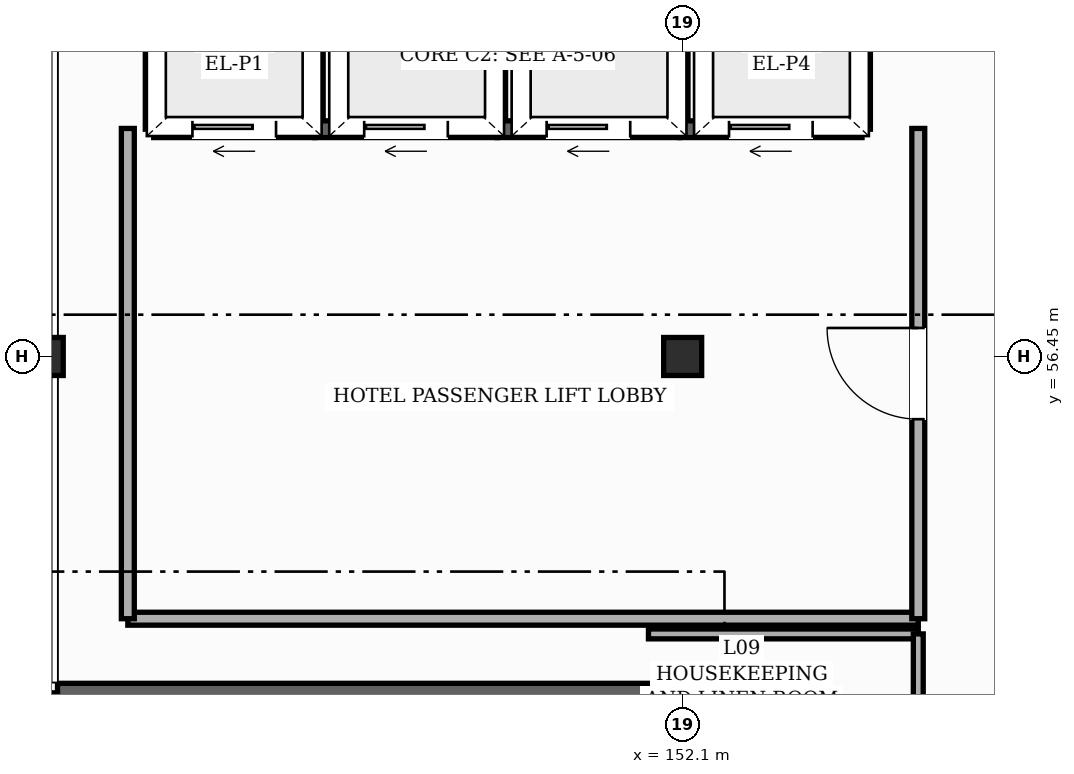
"""IFC4 building model, lengths in metres.
Left out: names, types, materials, properties, quantities, classifications, styles, units other than length and angle.
Written with IfcOpenShell. Run it as: python <this file> out.ifc"""

import sys

from ifc_helpers import new_model, si_unit, direction, frame, frame_2d, origin, origin_2d, place, context, subcontext, project, spatial, rectangle, hollow_rectangle, extrude, element, fill, save


model = new_model("IFC4")
c1 = context("Model", 3, precision=1e-05, world=origin(), true_north=direction((0.0, 1.0)))
c2 = subcontext(c1, "Body", "Model", "MODEL_VIEW")
j1 = project(units=[si_unit("LENGTHUNIT", "METRE"), si_unit("PLANEANGLEUNIT", "RADIAN")], contexts=[c1])
p1 = place(None, origin())
s1 = spatial("IfcSite", under=j1, at=p1, CompositionType="ELEMENT")
p2 = place(p1, origin())
s2 = spatial("IfcBuilding", under=s1, at=p2, CompositionType="ELEMENT")
p3 = place(p2, frame((0.0, 0.0, 39.0)))
s3 = spatial("IfcBuildingStorey", under=s2, at=p3, CompositionType="ELEMENT", Elevation=39.0)
for number, where, z_axis, x_axis in (
    (1, (143.7, 56.45, 0.0), (0.0, 0.0, 1.0), (1.0, 0.0, 0.0)),
    (2, (152.1, 56.45, 0.0), (0.0, 0.0, 1.0), (1.0, 0.0, 0.0)),
):
    element("IfcColumn", number, at=place(p3, frame(where, z_axis=z_axis, x_axis=x_axis)), inside=s3, PredefinedType="COLUMN", context=c2, shape_type="SweptSolid", body=[
        extrude(hollow_rectangle(XDim=0.5, YDim=0.5, WallThickness=0.022, InnerFilletRadius=0.022, OuterFilletRadius=0.044, at=origin_2d()), origin(), (0.0, 0.0, 1.0), 3.6),
    ])
for number, where, z_axis, x_axis in (
    (3, (143.875, 48.675, 0.0), (0.0, 0.0, 1.0), (0.0, 1.0, 0.0)),
    (4, (151.775, 52.025, 0.0), (0.0, 0.0, 1.0), (0.0, -1.0, 0.0)),
):
    element("IfcWall", number, at=place(p3, frame(where, z_axis=z_axis, x_axis=x_axis)), inside=s3, PredefinedType="SHEAR", context=c2, shape_type="SweptSolid", body=[
        extrude(rectangle(XDim=3.35, YDim=0.25, at=frame_2d((1.675, 0.0))), origin(), (0.0, 0.0, 1.0), 3.38),
    ])
p4 = place(p3, frame((143.875, 52.025, 0.0), z_axis=(0.0, 0.0, 1.0), x_axis=(1.0, 0.0, 0.0)))
e5 = element("IfcWall", 5, at=p4, inside=s3, PredefinedType="SHEAR", context=c2, shape_type="SweptSolid", body=[
    extrude(rectangle(XDim=7.9, YDim=0.25, at=frame_2d((3.95, 0.0))), origin(), (0.0, 0.0, 1.0), 3.38),
])
p5 = place(p3, frame((145.14, 59.44, 0.0), z_axis=(0.0, 0.0, 1.0), x_axis=(1.0, 0.0, 0.0)))
e6 = element("IfcWall", 6, at=p5, inside=s3, PredefinedType="SHEAR", context=c2, shape_type="SweptSolid", body=[
    extrude(rectangle(XDim=2.12, YDim=0.22, at=frame_2d((1.06, 0.0))), origin(), (0.0, 0.0, 1.0), 3.38),
])
p6 = place(p5, frame((0.51, 0.0, 0.0)))
e7 = element("IfcOpeningElement", 7, at=p6, cuts=e6, PredefinedType="OPENING", context=c2, shape_type="SweptSolid", body=[
    extrude(rectangle(XDim=1.1, YDim=2.2, at=frame_2d((0.55, 1.1))), frame((0.0, 0.12, 0.0), z_axis=(0.0, -1.0, 0.0), x_axis=(1.0, 0.0, 0.0)), (0.0, 0.0, 1.0), 0.24),
])
for number, where, z_axis, x_axis in (
    (8, (147.26, 59.44, 0.0), (0.0, 0.0, 1.0), (0.0, 1.0, 0.0)),
    (9, (145.14, 59.44, 0.0), (0.0, 0.0, 1.0), (0.0, 1.0, 0.0)),
):
    element("IfcWall", number, at=place(p3, frame(where, z_axis=z_axis, x_axis=x_axis)), inside=s3, PredefinedType="SHEAR", context=c2, shape_type="SweptSolid", body=[
        extrude(rectangle(XDim=1.92, YDim=0.22, at=frame_2d((0.96, 0.0))), origin(), (0.0, 0.0, 1.0), 3.38),
    ])
p7 = place(p3, frame((147.26, 59.44, 0.0), z_axis=(0.0, 0.0, 1.0), x_axis=(1.0, 0.0, 0.0)))
e10 = element("IfcWall", 10, at=p7, inside=s3, PredefinedType="SHEAR", context=c2, shape_type="SweptSolid", body=[
    extrude(rectangle(XDim=2.4, YDim=0.22, at=frame_2d((1.2, 0.0))), origin(), (0.0, 0.0, 1.0), 3.38),
])
p8 = place(p7, frame((0.65, 0.0, 0.0)))
e11 = element("IfcOpeningElement", 11, at=p8, cuts=e10, PredefinedType="OPENING", context=c2, shape_type="SweptSolid", body=[
    extrude(rectangle(XDim=1.1, YDim=2.2, at=frame_2d((0.55, 1.1))), frame((0.0, 0.12, 0.0), z_axis=(0.0, -1.0, 0.0), x_axis=(1.0, 0.0, 0.0)), (0.0, 0.0, 1.0), 0.24),
])
p9 = place(p3, frame((149.66, 59.44, 0.0), z_axis=(0.0, 0.0, 1.0), x_axis=(0.0, 1.0, 0.0)))
e12 = element("IfcWall", 12, at=p9, inside=s3, PredefinedType="SHEAR", context=c2, shape_type="SweptSolid", body=[
    extrude(rectangle(XDim=1.92, YDim=0.22, at=frame_2d((0.96, 0.0))), origin(), (0.0, 0.0, 1.0), 3.38),
])
p10 = place(p3, frame((149.66, 59.44, 0.0), z_axis=(0.0, 0.0, 1.0), x_axis=(1.0, 0.0, 0.0)))
e13 = element("IfcWall", 13, at=p10, inside=s3, PredefinedType="SHEAR", context=c2, shape_type="SweptSolid", body=[
    extrude(rectangle(XDim=2.4, YDim=0.22, at=frame_2d((1.2, 0.0))), origin(), (0.0, 0.0, 1.0), 3.38),
])
p11 = place(p10, frame((0.65, 0.0, 0.0)))
e14 = element("IfcOpeningElement", 14, at=p11, cuts=e13, PredefinedType="OPENING", context=c2, shape_type="SweptSolid", body=[
    extrude(rectangle(XDim=1.1, YDim=2.2, at=frame_2d((0.55, 1.1))), frame((0.0, 0.12, 0.0), z_axis=(0.0, -1.0, 0.0), x_axis=(1.0, 0.0, 0.0)), (0.0, 0.0, 1.0), 0.24),
])
p12 = place(p3, frame((152.06, 59.44, 0.0), z_axis=(0.0, 0.0, 1.0), x_axis=(0.0, 1.0, 0.0)))
e15 = element("IfcWall", 15, at=p12, inside=s3, PredefinedType="SHEAR", context=c2, shape_type="SweptSolid", body=[
    extrude(rectangle(XDim=1.92, YDim=0.22, at=frame_2d((0.96, 0.0))), origin(), (0.0, 0.0, 1.0), 3.38),
])
p13 = place(p3, frame((152.06, 59.44, 0.0), z_axis=(0.0, 0.0, 1.0), x_axis=(1.0, 0.0, 0.0)))
e16 = element("IfcWall", 16, at=p13, inside=s3, PredefinedType="SHEAR", context=c2, shape_type="SweptSolid", body=[
    extrude(rectangle(XDim=2.4, YDim=0.22, at=frame_2d((1.2, 0.0))), origin(), (0.0, 0.0, 1.0), 3.38),
])
p14 = place(p13, frame((0.65, 0.0, 0.0)))
e17 = element("IfcOpeningElement", 17, at=p14, cuts=e16, PredefinedType="OPENING", context=c2, shape_type="SweptSolid", body=[
    extrude(rectangle(XDim=1.1, YDim=2.2, at=frame_2d((0.55, 1.1))), frame((0.0, 0.12, 0.0), z_axis=(0.0, -1.0, 0.0), x_axis=(1.0, 0.0, 0.0)), (0.0, 0.0, 1.0), 0.24),
])
p15 = place(p3, frame((154.46, 59.44, 0.0), z_axis=(0.0, 0.0, 1.0), x_axis=(0.0, 1.0, 0.0)))
e18 = element("IfcWall", 18, at=p15, inside=s3, PredefinedType="SHEAR", context=c2, shape_type="SweptSolid", body=[
    extrude(rectangle(XDim=1.92, YDim=0.22, at=frame_2d((0.96, 0.0))), origin(), (0.0, 0.0, 1.0), 3.38),
])
p16 = place(p3, frame((151.65, 52.8, 0.0), z_axis=(0.0, 0.0, 1.0), x_axis=(1.0, 0.0, 0.0)))
e19 = element("IfcWall", 19, at=p16, inside=s3, PredefinedType="PARTITIONING", context=c2, shape_type="SweptSolid", body=[
    extrude(rectangle(XDim=3.55, YDim=0.13, at=frame_2d((1.775, 0.0))), origin(), (0.0, 0.0, 1.0), 3.365),
])
p17 = place(p3, frame((144.8, 53.0, 0.0), z_axis=(0.0, 0.0, 1.0), x_axis=(1.0, 0.0, 0.0)))
e20 = element("IfcWall", 20, at=p17, inside=s3, PredefinedType="PARTITIONING", context=c2, shape_type="SweptSolid", body=[
    extrude(rectangle(XDim=10.4, YDim=0.17, at=frame_2d((5.2, 0.0))), origin(), (0.0, 0.0, 1.0), 3.365),
])
p18 = place(p3, frame((144.8, 53.0, 0.0), z_axis=(0.0, 0.0, 1.0), x_axis=(0.0, 1.0, 0.0)))
e21 = element("IfcWall", 21, at=p18, inside=s3, PredefinedType="PARTITIONING", context=c2, shape_type="SweptSolid", body=[
    extrude(rectangle(XDim=6.45, YDim=0.17, at=frame_2d((3.225, 0.0))), origin(), (0.0, 0.0, 1.0), 3.365),
])
p19 = place(p3, frame((155.2, 48.8, 0.0), z_axis=(0.0, 0.0, 1.0), x_axis=(0.0, 1.0, 0.0)))
e22 = element("IfcWall", 22, at=p19, inside=s3, PredefinedType="PARTITIONING", context=c2, shape_type="SweptSolid", body=[
    extrude(rectangle(XDim=4.0, YDim=0.13, at=frame_2d((2.0, 0.0))), origin(), (0.0, 0.0, 1.0), 3.365),
])
p20 = place(p19, frame((1.55, 0.0, 0.0)))
e23 = element("IfcOpeningElement", 23, at=p20, cuts=e22, PredefinedType="OPENING", context=c2, shape_type="SweptSolid", body=[
    extrude(rectangle(XDim=0.9, YDim=2.15, at=frame_2d((0.45, 1.075))), frame((0.0, 0.075, 0.0), z_axis=(0.0, -1.0, 0.0), x_axis=(1.0, 0.0, 0.0)), (0.0, 0.0, 1.0), 0.15),
])
p21 = place(p3, frame((155.2, 53.0, 0.0), z_axis=(0.0, 0.0, 1.0), x_axis=(0.0, 1.0, 0.0)))
e24 = element("IfcWall", 24, at=p21, inside=s3, PredefinedType="PARTITIONING", context=c2, shape_type="SweptSolid", body=[
    extrude(rectangle(XDim=6.45, YDim=0.17, at=frame_2d((3.225, 0.0))), origin(), (0.0, 0.0, 1.0), 3.365),
])
p22 = place(p21, frame((2.625, 0.0, 0.0)))
e25 = element("IfcOpeningElement", 25, at=p22, cuts=e24, PredefinedType="OPENING", context=c2, shape_type="SweptSolid", body=[
    extrude(rectangle(XDim=1.2, YDim=2.2, at=frame_2d((0.6, 1.1))), frame((0.0, 0.095, 0.0), z_axis=(0.0, -1.0, 0.0), x_axis=(1.0, 0.0, 0.0)), (0.0, 0.0, 1.0), 0.19),
])
p23 = place(p6, origin())
e26 = element("IfcDoor", 26, at=p23, inside=s3, OperationType="SLIDING_TO_LEFT", PredefinedType="DOOR", context=c2, shape_type="SweptSolid", body=[
    extrude(rectangle(XDim=1.1, YDim=2.2, at=frame_2d((0.55, 1.1))), frame((0.0, 0.025, 0.0), z_axis=(0.0, -1.0, 0.0), x_axis=(1.0, 0.0, 0.0)), (0.0, 0.0, 1.0), 0.05),
])
fill(e7, e26)
p24 = place(p8, origin())
e27 = element("IfcDoor", 27, at=p24, inside=s3, OperationType="SLIDING_TO_LEFT", PredefinedType="DOOR", context=c2, shape_type="SweptSolid", body=[
    extrude(rectangle(XDim=1.1, YDim=2.2, at=frame_2d((0.55, 1.1))), frame((0.0, 0.025, 0.0), z_axis=(0.0, -1.0, 0.0), x_axis=(1.0, 0.0, 0.0)), (0.0, 0.0, 1.0), 0.05),
])
fill(e11, e27)
p25 = place(p11, origin())
e28 = element("IfcDoor", 28, at=p25, inside=s3, OperationType="SLIDING_TO_LEFT", PredefinedType="DOOR", context=c2, shape_type="SweptSolid", body=[
    extrude(rectangle(XDim=1.1, YDim=2.2, at=frame_2d((0.55, 1.1))), frame((0.0, 0.025, 0.0), z_axis=(0.0, -1.0, 0.0), x_axis=(1.0, 0.0, 0.0)), (0.0, 0.0, 1.0), 0.05),
])
fill(e14, e28)
p26 = place(p14, origin())
e29 = element("IfcDoor", 29, at=p26, inside=s3, OperationType="SLIDING_TO_LEFT", PredefinedType="DOOR", context=c2, shape_type="SweptSolid", body=[
    extrude(rectangle(XDim=1.1, YDim=2.2, at=frame_2d((0.55, 1.1))), frame((0.0, 0.025, 0.0), z_axis=(0.0, -1.0, 0.0), x_axis=(1.0, 0.0, 0.0)), (0.0, 0.0, 1.0), 0.05),
])
fill(e17, e29)
p27 = place(p22, origin())
e30 = element("IfcDoor", 30, at=p27, inside=s3, OperationType="SINGLE_SWING_RIGHT", PredefinedType="DOOR", context=c2, shape_type="SweptSolid", body=[
    extrude(rectangle(XDim=1.2, YDim=2.2, at=frame_2d((0.6, 1.1))), frame((0.0, 0.025, 0.0), z_axis=(0.0, -1.0, 0.0), x_axis=(1.0, 0.0, 0.0)), (0.0, 0.0, 1.0), 0.05),
])
fill(e25, e30)
save(model, sys.argv[1])
